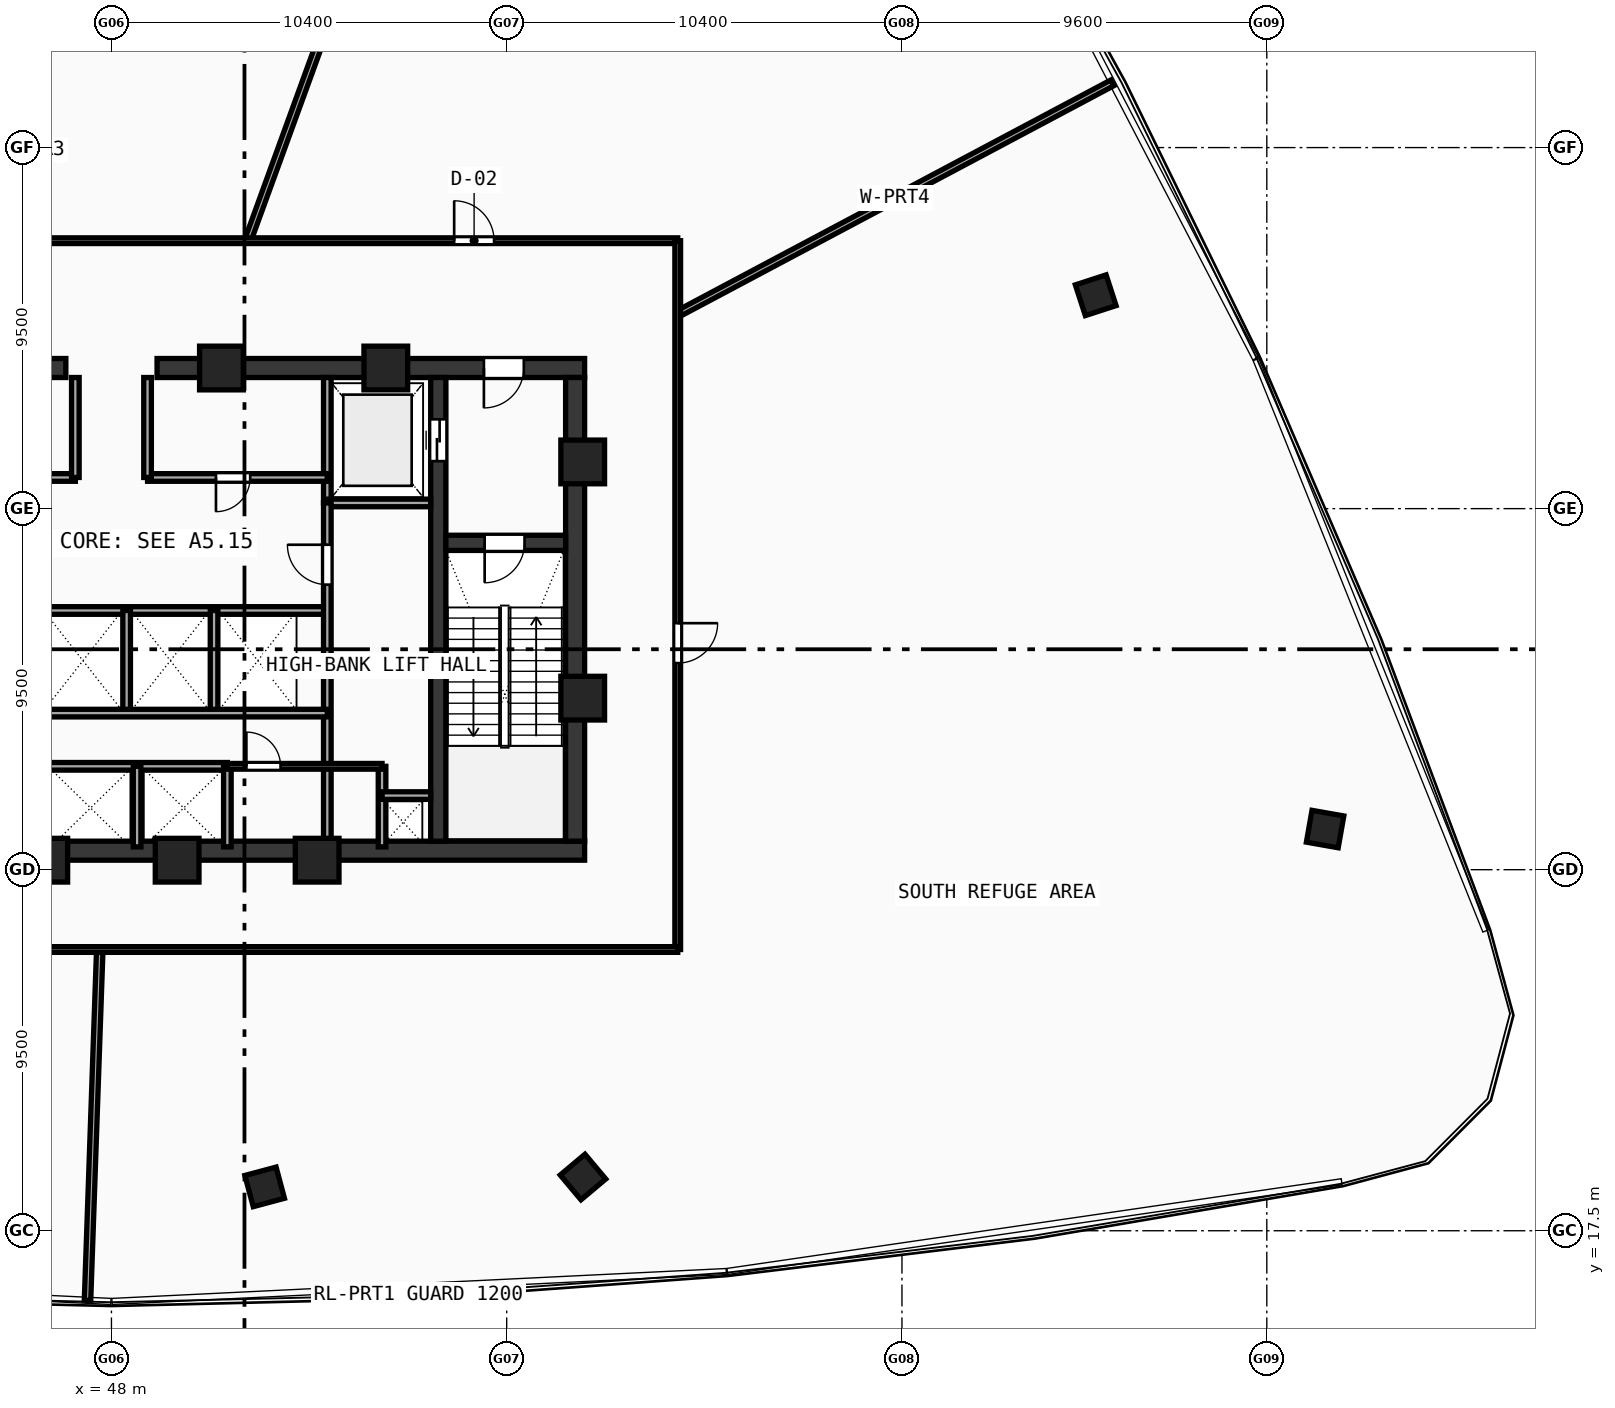
"""IFC4 building model, lengths in metres.
Left out: names, types, materials, properties, quantities, classifications, styles, units other than length and angle.
Written with IfcOpenShell. Run it as: python <this file> out.ifc"""

import sys

from ifc_helpers import new_model, si_unit, direction, frame, frame_2d, origin, origin_with_axes, origin_2d, place, context, subcontext, project, spatial, rectangle, hollow_rectangle, extrude, source, transform, mapped, element, fill, save


model = new_model("IFC4")
c1 = context("Model", 3, precision=1e-05, world=origin(), true_north=direction((0.0, 1.0)))
c2 = subcontext(c1, "Body", "Model", "MODEL_VIEW")
j1 = project(units=[si_unit("LENGTHUNIT", "METRE"), si_unit("PLANEANGLEUNIT", "RADIAN")], contexts=[c1])
p1 = place(None, origin())
s1 = spatial("IfcSite", under=j1, at=p1, CompositionType="ELEMENT")
p2 = place(p1, origin())
s2 = spatial("IfcBuilding", under=s1, at=p2, CompositionType="ELEMENT")
p3 = place(p2, frame((0.0, 0.0, 224.81)))
s3 = spatial("IfcBuildingStorey", under=s2, at=p3, CompositionType="ELEMENT", Elevation=224.81)
p4 = place(p3, frame((35.55, 27.5, 0.0), z_axis=(0.0, 0.0, 1.0), x_axis=(1.0, 0.0, 0.0)))
e1 = element("IfcWall", 1, at=p4, inside=s3, PredefinedType="SHEAR", context=c2, shape_type="SweptSolid", body=[
    extrude(rectangle(XDim=24.9, YDim=0.5, at=frame_2d((12.45, 0.0))), origin(), (0.0, 0.0, 1.0), 4.54),
])
p5 = place(p3, frame((35.55, 40.2, 0.0), z_axis=(0.0, 0.0, 1.0), x_axis=(1.0, 0.0, 0.0)))
e2 = element("IfcWall", 2, at=p5, inside=s3, PredefinedType="SHEAR", context=c2, shape_type="SweptSolid", body=[
    extrude(rectangle(XDim=11.25, YDim=0.5, at=frame_2d((5.625, 0.0))), origin(), (0.0, 0.0, 1.0), 4.54),
])
p6 = place(p5, frame((1.6, 0.0, 0.0)))
e3 = element("IfcOpeningElement", 3, at=p6, cuts=e2, PredefinedType="OPENING", context=c2, shape_type="SweptSolid", body=[
    extrude(rectangle(XDim=1.05, YDim=2.1, at=frame_2d((0.525, 1.05))), frame((0.0, 0.26, 0.0), z_axis=(0.0, -1.0, 0.0), x_axis=(1.0, 0.0, 0.0)), (0.0, 0.0, 1.0), 0.52),
])
p7 = place(p3, frame((49.2, 40.2, 0.0), z_axis=(0.0, 0.0, 1.0), x_axis=(1.0, 0.0, 0.0)))
e4 = element("IfcWall", 4, at=p7, inside=s3, PredefinedType="SHEAR", context=c2, shape_type="SweptSolid", body=[
    extrude(rectangle(XDim=11.25, YDim=0.5, at=frame_2d((5.625, 0.0))), origin(), (0.0, 0.0, 1.0), 4.54),
])
p8 = place(p7, frame((8.6, 0.0, 0.0)))
e5 = element("IfcOpeningElement", 5, at=p8, cuts=e4, PredefinedType="OPENING", context=c2, shape_type="SweptSolid", body=[
    extrude(rectangle(XDim=1.05, YDim=2.1, at=frame_2d((0.525, 1.05))), frame((0.0, 0.26, 0.0), z_axis=(0.0, -1.0, 0.0), x_axis=(1.0, 0.0, 0.0)), (0.0, 0.0, 1.0), 0.52),
])
p9 = place(p3, frame((60.2, 27.75, 0.0), z_axis=(0.0, 0.0, 1.0), x_axis=(0.0, 1.0, 0.0)))
e6 = element("IfcWall", 6, at=p9, inside=s3, PredefinedType="SHEAR", context=c2, shape_type="SweptSolid", body=[
    extrude(rectangle(XDim=12.2, YDim=0.5, at=frame_2d((6.1, 0.0))), origin(), (0.0, 0.0, 1.0), 4.54),
])
p10 = place(p3, frame((56.6, 27.75, 0.0), z_axis=(0.0, 0.0, 1.0), x_axis=(0.0, 1.0, 0.0)))
e7 = element("IfcWall", 7, at=p10, inside=s3, PredefinedType="SHEAR", context=c2, shape_type="SweptSolid", body=[
    extrude(rectangle(XDim=12.2, YDim=0.4, at=frame_2d((6.1, 0.0))), origin(), (0.0, 0.0, 1.0), 4.54),
])
p11 = place(p10, frame((10.0, 0.0, 0.0)))
e8 = element("IfcOpeningElement", 8, at=p11, cuts=e7, PredefinedType="OPENING", context=c2, shape_type="SweptSolid", body=[
    extrude(rectangle(XDim=1.1, YDim=2.1, at=frame_2d((0.55, 1.05))), frame((0.0, 0.21, 0.0), z_axis=(0.0, -1.0, 0.0), x_axis=(1.0, 0.0, 0.0)), (0.0, 0.0, 1.0), 0.42),
])
p12 = place(p3, frame((56.8, 35.6, 0.0), z_axis=(0.0, 0.0, 1.0), x_axis=(1.0, 0.0, 0.0)))
e9 = element("IfcWall", 9, at=p12, inside=s3, PredefinedType="SHEAR", context=c2, shape_type="SweptSolid", body=[
    extrude(rectangle(XDim=3.15, YDim=0.4, at=frame_2d((1.575, 0.0))), origin(), (0.0, 0.0, 1.0), 4.54),
])
p13 = place(p12, frame((1.02, 0.0, 0.0)))
e10 = element("IfcOpeningElement", 10, at=p13, cuts=e9, PredefinedType="OPENING", context=c2, shape_type="SweptSolid", body=[
    extrude(rectangle(XDim=1.05, YDim=2.1, at=frame_2d((0.525, 1.05))), frame((0.0, 0.21, 0.0), z_axis=(0.0, -1.0, 0.0), x_axis=(1.0, 0.0, 0.0)), (0.0, 0.0, 1.0), 0.42),
])
m1 = source(origin(), c2, "Body", "SweptSolid", [
    extrude(hollow_rectangle(XDim=1.15, YDim=1.15, WallThickness=0.048, at=origin_2d()), origin(), (0.0, 0.0, 1.0), 4.82),
])
for number, where, z_axis, x_axis in (
    (11, (46.272, 27.25, -0.28), (0.0, 0.0, 1.0), (1.0, 0.0, 0.0)),
    (12, (49.729, 27.25, -0.28), (0.0, 0.0, 1.0), (1.0, 0.0, 0.0)),
    (13, (53.412, 27.25, -0.28), (0.0, 0.0, 1.0), (1.0, 0.0, 0.0)),
    (14, (60.4, 31.513, -0.28), (0.0, 0.0, 1.0), (1.0, 0.0, 0.0)),
    (15, (60.4, 37.729, -0.28), (0.0, 0.0, 1.0), (1.0, 0.0, 0.0)),
    (16, (55.219, 40.2, -0.28), (0.0, 0.0, 1.0), (1.0, 0.0, 0.0)),
    (17, (50.894, 40.2, -0.28), (0.0, 0.0, 1.0), (1.0, 0.0, 0.0)),
):
    element("IfcColumn", number, at=place(p3, frame(where, z_axis=z_axis, x_axis=x_axis)), inside=s3, PredefinedType="COLUMN", context=c2, shape_type="MappedRepresentation", body=[
        mapped(m1, transform((0.0, 0.0, 0.0), scale=1.0)),
    ])
m2 = source(origin(), c2, "Body", "SweptSolid", [
    extrude(hollow_rectangle(XDim=0.85, YDim=0.85, WallThickness=0.034, at=origin_2d()), origin(), (0.0, 0.0, 1.0), 4.82),
])
for number, where, z_axis, x_axis in (
    (18, (52.031, 18.654, -0.28), (0.0, 0.0, 1.0), (0.966, 0.259, 0.0)),
    (19, (60.407, 18.914, -0.28), (0.0, 0.0, 1.0), (0.766, 0.643, 0.0)),
    (20, (79.934, 28.069, -0.28), (0.0, 0.0, 1.0), (0.174, 0.985, 0.0)),
    (21, (73.899, 42.115, -0.28), (0.0, 0.0, 1.0), (-0.309, 0.951, 0.0)),
):
    element("IfcColumn", number, at=place(p3, frame(where, z_axis=z_axis, x_axis=x_axis)), inside=s3, PredefinedType="COLUMN", context=c2, shape_type="MappedRepresentation", body=[
        mapped(m2, transform((0.0, 0.0, 0.0), scale=1.0)),
    ])
p14 = place(p3, frame((53.68, 36.65, 0.0), z_axis=(0.0, 0.0, 1.0), x_axis=(0.0, 1.0, 0.0)))
e22 = element("IfcWall", 22, at=p14, inside=s3, PredefinedType="SOLIDWALL", context=c2, shape_type="SweptSolid", body=[
    extrude(rectangle(XDim=3.3, YDim=0.2, at=frame_2d((1.65, 0.0))), origin(), (0.0, 0.0, 1.0), 4.54),
])
p15 = place(p3, frame((53.68, 36.65, 0.0), z_axis=(0.0, 0.0, 1.0), x_axis=(1.0, 0.0, 0.0)))
e23 = element("IfcWall", 23, at=p15, inside=s3, PredefinedType="SOLIDWALL", context=c2, shape_type="SweptSolid", body=[
    extrude(rectangle(XDim=2.72, YDim=0.2, at=frame_2d((1.36, 0.0))), origin(), (0.0, 0.0, 1.0), 4.54),
])
p16 = place(p3, frame((42.32, 37.32, 0.0), z_axis=(0.0, 0.0, 1.0), x_axis=(1.0, 0.0, 0.0)))
e24 = element("IfcWall", 24, at=p16, inside=s3, PredefinedType="SOLIDWALL", context=c2, shape_type="SweptSolid", body=[
    extrude(rectangle(XDim=4.73, YDim=0.2, at=frame_2d((2.365, 0.0))), origin(), (0.0, 0.0, 1.0), 4.54),
])
p17 = place(p16, frame((1.8, 0.0, 0.0)))
e25 = element("IfcOpeningElement", 25, at=p17, cuts=e24, PredefinedType="OPENING", context=c2, shape_type="SweptSolid", body=[
    extrude(rectangle(XDim=0.9, YDim=2.1, at=frame_2d((0.45, 1.05))), frame((0.0, 0.11, 0.0), z_axis=(0.0, -1.0, 0.0), x_axis=(1.0, 0.0, 0.0)), (0.0, 0.0, 1.0), 0.22),
])
p18 = place(p3, frame((48.95, 37.32, 0.0), z_axis=(0.0, 0.0, 1.0), x_axis=(1.0, 0.0, 0.0)))
e26 = element("IfcWall", 26, at=p18, inside=s3, PredefinedType="SOLIDWALL", context=c2, shape_type="SweptSolid", body=[
    extrude(rectangle(XDim=4.73, YDim=0.2, at=frame_2d((2.365, 0.0))), origin(), (0.0, 0.0, 1.0), 4.54),
])
p19 = place(p18, frame((1.8, 0.0, 0.0)))
e27 = element("IfcOpeningElement", 27, at=p19, cuts=e26, PredefinedType="OPENING", context=c2, shape_type="SweptSolid", body=[
    extrude(rectangle(XDim=0.9, YDim=2.1, at=frame_2d((0.45, 1.05))), frame((0.0, 0.11, 0.0), z_axis=(0.0, -1.0, 0.0), x_axis=(1.0, 0.0, 0.0)), (0.0, 0.0, 1.0), 0.22),
])
for number, where, z_axis, x_axis in (
    (28, (47.05, 37.32, 0.0), (0.0, 0.0, 1.0), (0.0, 1.0, 0.0)),
    (29, (48.95, 37.32, 0.0), (0.0, 0.0, 1.0), (0.0, 1.0, 0.0)),
):
    element("IfcWall", number, at=place(p3, frame(where, z_axis=z_axis, x_axis=x_axis)), inside=s3, PredefinedType="SOLIDWALL", context=c2, shape_type="SweptSolid", body=[
        extrude(rectangle(XDim=2.63, YDim=0.2, at=frame_2d((1.315, 0.0))), origin(), (0.0, 0.0, 1.0), 4.54),
    ])
p20 = place(p3, frame((43.85, 33.82, 0.0), z_axis=(0.0, 0.0, 1.0), x_axis=(1.0, 0.0, 0.0)))
e30 = element("IfcWall", 30, at=p20, inside=s3, PredefinedType="SOLIDWALL", context=c2, shape_type="SweptSolid", body=[
    extrude(rectangle(XDim=9.83, YDim=0.2, at=frame_2d((4.915, 0.0))), origin(), (0.0, 0.0, 1.0), 4.54),
])
p21 = place(p3, frame((53.68, 27.6, 0.0), z_axis=(0.0, 0.0, 1.0), x_axis=(0.0, 1.0, 0.0)))
e31 = element("IfcWall", 31, at=p21, inside=s3, PredefinedType="SOLIDWALL", context=c2, shape_type="SweptSolid", body=[
    extrude(rectangle(XDim=9.05, YDim=0.2, at=frame_2d((4.525, 0.0))), origin(), (0.0, 0.0, 1.0), 4.54),
])
p22 = place(p21, frame((6.9, 0.0, 0.0)))
e32 = element("IfcOpeningElement", 32, at=p22, cuts=e31, PredefinedType="OPENING", context=c2, shape_type="SweptSolid", body=[
    extrude(rectangle(XDim=1.05, YDim=2.1, at=frame_2d((0.525, 1.05))), frame((0.0, 0.11, 0.0), z_axis=(0.0, -1.0, 0.0), x_axis=(1.0, 0.0, 0.0)), (0.0, 0.0, 1.0), 0.22),
])
for number, where, z_axis, x_axis in (
    (33, (48.4, 31.12, 0.0), (0.0, 0.0, 1.0), (0.0, 1.0, 0.0)),
    (34, (50.7, 31.12, 0.0), (0.0, 0.0, 1.0), (0.0, 1.0, 0.0)),
):
    element("IfcWall", number, at=place(p3, frame(where, z_axis=z_axis, x_axis=x_axis)), inside=s3, PredefinedType="SOLIDWALL", context=c2, shape_type="SweptSolid", body=[
        extrude(rectangle(XDim=2.7, YDim=0.2, at=frame_2d((1.35, 0.0))), origin(), (0.0, 0.0, 1.0), 4.54),
    ])
p23 = place(p3, frame((43.85, 29.72, 0.0), z_axis=(0.0, 0.0, 1.0), x_axis=(1.0, 0.0, 0.0)))
e35 = element("IfcWall", 35, at=p23, inside=s3, PredefinedType="SOLIDWALL", context=c2, shape_type="SweptSolid", body=[
    extrude(rectangle(XDim=7.2, YDim=0.2, at=frame_2d((3.6, 0.0))), origin(), (0.0, 0.0, 1.0), 4.54),
])
p24 = place(p3, frame((51.05, 27.6, 0.0), z_axis=(0.0, 0.0, 1.0), x_axis=(0.0, 1.0, 0.0)))
e36 = element("IfcWall", 36, at=p24, inside=s3, PredefinedType="SOLIDWALL", context=c2, shape_type="SweptSolid", body=[
    extrude(rectangle(XDim=2.12, YDim=0.2, at=frame_2d((1.06, 0.0))), origin(), (0.0, 0.0, 1.0), 4.54),
])
p25 = place(p3, frame((43.85, 31.12, 0.0), z_axis=(0.0, 0.0, 1.0), x_axis=(1.0, 0.0, 0.0)))
e37 = element("IfcWall", 37, at=p25, inside=s3, PredefinedType="SOLIDWALL", context=c2, shape_type="SweptSolid", body=[
    extrude(rectangle(XDim=9.83, YDim=0.2, at=frame_2d((4.915, 0.0))), origin(), (0.0, 0.0, 1.0), 4.54),
])
for number, where, z_axis, x_axis in (
    (38, (48.675, 27.6, 0.0), (0.0, 0.0, 1.0), (0.0, 1.0, 0.0)),
    (39, (55.12, 27.6, 0.0), (0.0, 0.0, 1.0), (0.0, 1.0, 0.0)),
):
    element("IfcWall", number, at=place(p3, frame(where, z_axis=z_axis, x_axis=x_axis)), inside=s3, PredefinedType="SOLIDWALL", context=c2, shape_type="SweptSolid", body=[
        extrude(rectangle(XDim=2.12, YDim=0.2, at=frame_2d((1.06, 0.0))), origin(), (0.0, 0.0, 1.0), 4.54),
    ])
p26 = place(p3, frame((55.12, 28.95, 0.0), z_axis=(0.0, 0.0, 1.0), x_axis=(1.0, 0.0, 0.0)))
e40 = element("IfcWall", 40, at=p26, inside=s3, PredefinedType="SOLIDWALL", context=c2, shape_type="SweptSolid", body=[
    extrude(rectangle(XDim=1.28, YDim=0.2, at=frame_2d((0.64, 0.0))), origin(), (0.0, 0.0, 1.0), 4.54),
])
p27 = place(p3, frame((51.05, 29.72, 0.0), z_axis=(0.0, 0.0, 1.0), x_axis=(1.0, 0.0, 0.0)))
e41 = element("IfcWall", 41, at=p27, inside=s3, PredefinedType="PARTITIONING", context=c2, shape_type="SweptSolid", body=[
    extrude(rectangle(XDim=4.07, YDim=0.15, at=frame_2d((2.035, 0.0))), origin(), (0.0, 0.0, 1.0), 4.54),
])
p28 = place(p27, frame((0.5, 0.0, 0.0)))
e42 = element("IfcOpeningElement", 42, at=p28, cuts=e41, PredefinedType="OPENING", context=c2, shape_type="SweptSolid", body=[
    extrude(rectangle(XDim=0.9, YDim=2.1, at=frame_2d((0.45, 1.05))), frame((0.0, 0.085, 0.0), z_axis=(0.0, -1.0, 0.0), x_axis=(1.0, 0.0, 0.0)), (0.0, 0.0, 1.0), 0.17),
])
p29 = place(p3, frame((62.9, 41.623, 0.0), z_axis=(0.0, 0.0, 1.0), x_axis=(0.88294771871, 0.469471326093, 0.0)))
e43 = element("IfcWall", 43, at=p29, inside=s3, PredefinedType="PARTITIONING", context=c2, shape_type="SweptSolid", body=[
    extrude(rectangle(XDim=12.949, YDim=0.17, at=frame_2d((6.475, 0.0))), origin(), (0.0, 0.0, 1.0), 3.89),
])
p30 = place(p3, frame((51.585, 43.55, 0.0), z_axis=(0.0, 0.0, 1.0), x_axis=(0.342012903323, 0.9396952559, 0.0)))
e44 = element("IfcWall", 44, at=p30, inside=s3, PredefinedType="PARTITIONING", context=c2, shape_type="SweptSolid", body=[
    extrude(rectangle(XDim=27.458, YDim=0.17, at=frame_2d((13.729, 0.0))), origin(), (0.0, 0.0, 1.0), 3.89),
])
p31 = place(p3, frame((47.693, 24.9, 0.0), z_axis=(0.0, 0.0, 1.0), x_axis=(-0.034893830419, -0.999391024874, 0.0)))
e45 = element("IfcWall", 45, at=p31, inside=s3, PredefinedType="PARTITIONING", context=c2, shape_type="SweptSolid", body=[
    extrude(rectangle(XDim=9.236, YDim=0.17, at=frame_2d((4.618, 0.0))), origin(), (0.0, 0.0, 1.0), 3.89),
])
p32 = place(p3, frame((45.85, 43.55, 0.0), z_axis=(0.0, 0.0, 1.0), x_axis=(1.0, 0.0, 0.0)))
e46 = element("IfcWall", 46, at=p32, inside=s3, PredefinedType="PARTITIONING", context=c2, shape_type="SweptSolid", body=[
    extrude(rectangle(XDim=17.05, YDim=0.15, at=frame_2d((8.525, 0.0))), origin(), (0.0, 0.0, 1.0), 3.89),
])
p33 = place(p32, frame((11.167, 0.0, 0.0)))
e47 = element("IfcOpeningElement", 47, at=p33, cuts=e46, PredefinedType="OPENING", context=c2, shape_type="SweptSolid", body=[
    extrude(rectangle(XDim=1.05, YDim=2.1, at=frame_2d((0.525, 1.05))), frame((0.0, 0.085, 0.0), z_axis=(0.0, -1.0, 0.0), x_axis=(1.0, 0.0, 0.0)), (0.0, 0.0, 1.0), 0.17),
])
p34 = place(p3, frame((62.9, 43.55, 0.0), z_axis=(0.0, 0.0, 1.0), x_axis=(0.0, -1.0, 0.0)))
e48 = element("IfcWall", 48, at=p34, inside=s3, PredefinedType="PARTITIONING", context=c2, shape_type="SweptSolid", body=[
    extrude(rectangle(XDim=18.65, YDim=0.15, at=frame_2d((9.325, 0.0))), origin(), (0.0, 0.0, 1.0), 3.89),
])
p35 = place(p34, frame((10.064, 0.0, 0.0)))
e49 = element("IfcOpeningElement", 49, at=p35, cuts=e48, PredefinedType="OPENING", context=c2, shape_type="SweptSolid", body=[
    extrude(rectangle(XDim=1.05, YDim=2.1, at=frame_2d((0.525, 1.05))), frame((0.0, 0.085, 0.0), z_axis=(0.0, -1.0, 0.0), x_axis=(1.0, 0.0, 0.0)), (0.0, 0.0, 1.0), 0.17),
])
p36 = place(p3, frame((62.9, 24.9, 0.0), z_axis=(0.0, 0.0, 1.0), x_axis=(-1.0, 0.0, 0.0)))
e50 = element("IfcWall", 50, at=p36, inside=s3, PredefinedType="PARTITIONING", context=c2, shape_type="SweptSolid", body=[
    extrude(rectangle(XDim=29.8, YDim=0.15, at=frame_2d((14.9, 0.0))), origin(), (0.0, 0.0, 1.0), 3.89),
])
m3 = source(origin(), c2, "Body", "SweptSolid", [
    extrude(rectangle(XDim=1.05, YDim=2.1, at=frame_2d((0.525, 1.05))), frame((0.0, 0.025, 0.0), z_axis=(0.0, -1.0, 0.0), x_axis=(1.0, 0.0, 0.0)), (0.0, 0.0, 1.0), 0.05),
])
p37 = place(p13, frame((1.05, 0.0, 0.0), z_axis=(0.0, 0.0, 1.0), x_axis=(-1.0, 0.0, 0.0)))
e51 = element("IfcDoor", 51, at=p37, inside=s3, OperationType="SINGLE_SWING_RIGHT", PredefinedType="DOOR", context=c2, shape_type="MappedRepresentation", body=[
    mapped(m3, transform((0.0, 0.0, 0.0), scale=1.0)),
])
fill(e10, e51)
p38 = place(p8, frame((1.05, 0.0, 0.0), z_axis=(0.0, 0.0, 1.0), x_axis=(-1.0, 0.0, 0.0)))
e52 = element("IfcDoor", 52, at=p38, inside=s3, OperationType="SINGLE_SWING_RIGHT", PredefinedType="DOOR", context=c2, shape_type="MappedRepresentation", body=[
    mapped(m3, transform((0.0, 0.0, 0.0), scale=1.0)),
])
fill(e5, e52)
m4 = source(origin(), c2, "Body", "SweptSolid", [
    extrude(rectangle(XDim=1.1, YDim=2.1, at=frame_2d((0.55, 1.05))), frame((0.0, 0.025, 0.0), z_axis=(0.0, -1.0, 0.0), x_axis=(1.0, 0.0, 0.0)), (0.0, 0.0, 1.0), 0.05),
])
p39 = place(p11, origin_with_axes())
e53 = element("IfcDoor", 53, at=p39, inside=s3, OperationType="DOUBLE_DOOR_SLIDING", PredefinedType="DOOR", context=c2, shape_type="MappedRepresentation", body=[
    mapped(m4, transform((0.0, 0.0, 0.0), scale=1.0)),
])
fill(e8, e53)
m5 = source(origin(), c2, "Body", "SweptSolid", [
    extrude(rectangle(XDim=0.9, YDim=2.1, at=frame_2d((0.45, 1.05))), frame((0.0, 0.025, 0.0), z_axis=(0.0, -1.0, 0.0), x_axis=(1.0, 0.0, 0.0)), (0.0, 0.0, 1.0), 0.05),
])
p40 = place(p19, frame((0.9, 0.0, 0.0), z_axis=(0.0, 0.0, 1.0), x_axis=(-1.0, 0.0, 0.0)))
e54 = element("IfcDoor", 54, at=p40, inside=s3, OperationType="SINGLE_SWING_RIGHT", PredefinedType="DOOR", context=c2, shape_type="MappedRepresentation", body=[
    mapped(m5, transform((0.0, 0.0, 0.0), scale=1.0)),
])
fill(e27, e54)
p41 = place(p22, origin_with_axes())
e55 = element("IfcDoor", 55, at=p41, inside=s3, OperationType="SINGLE_SWING_RIGHT", PredefinedType="DOOR", context=c2, shape_type="MappedRepresentation", body=[
    mapped(m3, transform((0.0, 0.0, 0.0), scale=1.0)),
])
fill(e32, e55)
p42 = place(p28, origin_with_axes())
e56 = element("IfcDoor", 56, at=p42, inside=s3, OperationType="SINGLE_SWING_LEFT", PredefinedType="DOOR", context=c2, shape_type="MappedRepresentation", body=[
    mapped(m5, transform((0.0, 0.0, 0.0), scale=1.0)),
])
fill(e42, e56)
p43 = place(p33, origin_with_axes())
e57 = element("IfcDoor", 57, at=p43, inside=s3, OperationType="SINGLE_SWING_LEFT", PredefinedType="DOOR", context=c2, shape_type="MappedRepresentation", body=[
    mapped(m3, transform((0.0, 0.0, 0.0), scale=1.0)),
])
fill(e47, e57)
p44 = place(p35, origin_with_axes())
e58 = element("IfcDoor", 58, at=p44, inside=s3, OperationType="SINGLE_SWING_LEFT", PredefinedType="DOOR", context=c2, shape_type="MappedRepresentation", body=[
    mapped(m3, transform((0.0, 0.0, 0.0), scale=1.0)),
])
fill(e49, e58)
save(model, sys.argv[1])
